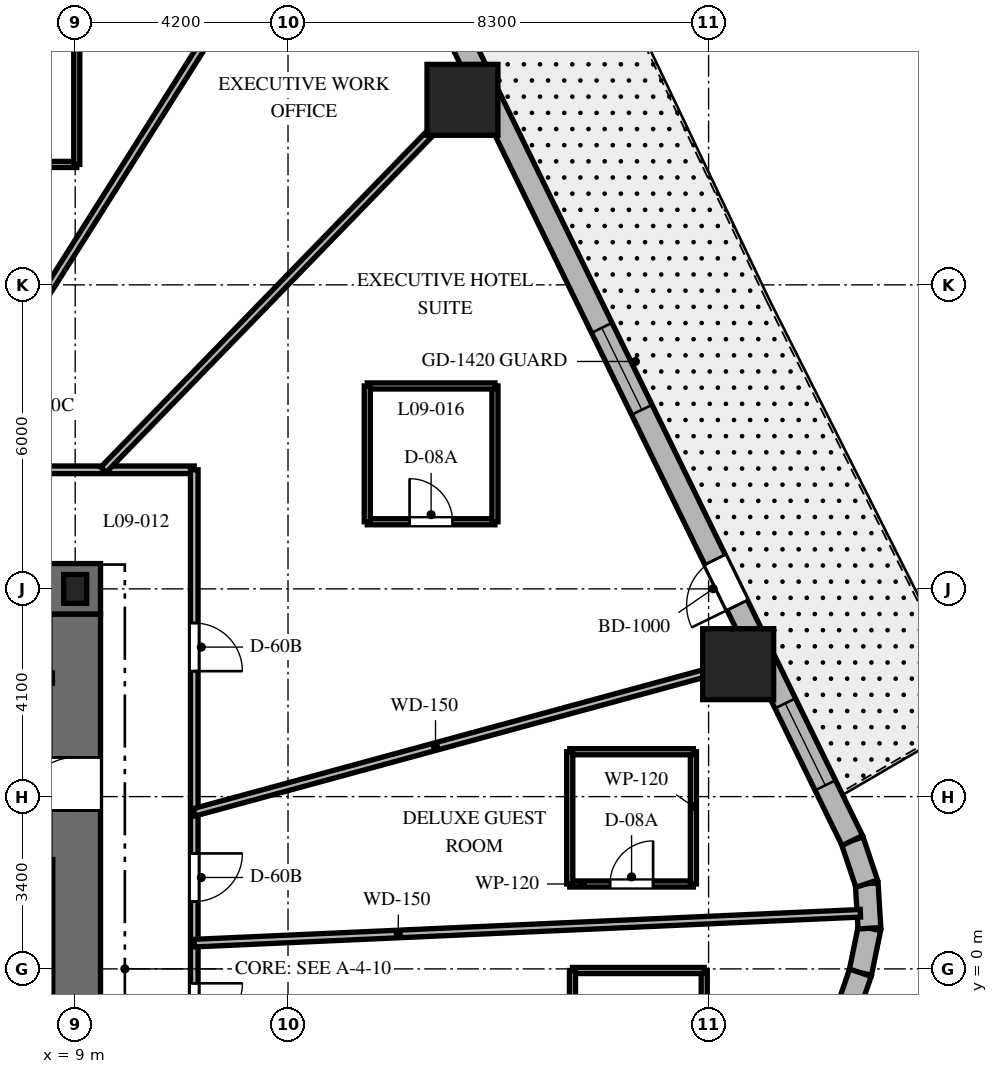
"""IFC4 building model, lengths in metres.
Left out: names, types, materials, properties, quantities, classifications, styles, units other than length and angle.
Written with IfcOpenShell. Run it as: python <this file> out.ifc"""

import sys

from ifc_helpers import new_model, si_unit, direction, frame, frame_2d, origin, origin_2d, place, context, subcontext, project, spatial, rectangle, i_section, extrude, element, fill, save


model = new_model("IFC4")
c1 = context("Model", 3, precision=1e-05, world=origin(), true_north=direction((0.0, 1.0)))
c2 = subcontext(c1, "Body", "Model", "MODEL_VIEW")
j1 = project(units=[si_unit("LENGTHUNIT", "METRE"), si_unit("PLANEANGLEUNIT", "RADIAN")], contexts=[c1])
p1 = place(None, origin())
s1 = spatial("IfcSite", under=j1, at=p1, CompositionType="ELEMENT")
p2 = place(p1, origin())
s2 = spatial("IfcBuilding", under=s1, at=p2, CompositionType="ELEMENT")
p3 = place(p2, frame((0.0, 0.0, 45.3)))
s3 = spatial("IfcBuildingStorey", under=s2, at=p3, CompositionType="ELEMENT", Elevation=45.3)
p4 = place(p3, frame((1.85, 7.5, 0.0), z_axis=(0.0, 0.0, 1.0), x_axis=(1.0, 0.0, 0.0)))
e1 = element("IfcWall", 1, at=p4, inside=s3, PredefinedType="SHEAR", context=c2, shape_type="SweptSolid", body=[
    extrude(rectangle(XDim=7.65, YDim=1.0, at=frame_2d((3.825, 0.0))), origin(), (0.0, 0.0, 1.0), 3.7),
])
p5 = place(p3, frame((9.0, -7.0, 0.0), z_axis=(0.0, 0.0, 1.0), x_axis=(0.0, 1.0, 0.0)))
e2 = element("IfcWall", 2, at=p5, inside=s3, PredefinedType="SHEAR", context=c2, shape_type="SweptSolid", body=[
    extrude(rectangle(XDim=14.0, YDim=1.0, at=frame_2d((7.0, 0.0))), origin(), (0.0, 0.0, 1.0), 3.7),
])
p6 = place(p5, frame((10.125, 0.0, 0.0)))
e3 = element("IfcOpeningElement", 3, at=p6, cuts=e2, PredefinedType="OPENING", context=c2, shape_type="SweptSolid", body=[
    extrude(rectangle(XDim=1.05, YDim=2.15, at=frame_2d((0.525, 1.075))), frame((0.0, 0.51, 0.0), z_axis=(0.0, -1.0, 0.0), x_axis=(1.0, 0.0, 0.0)), (0.0, 0.0, 1.0), 1.02),
])
p7 = place(p3, frame((8.458, -6.985, 0.0), z_axis=(0.0, 0.0, 1.0), x_axis=(0.0, 1.0, 0.0)))
e4 = element("IfcWall", 4, at=p7, inside=s3, PredefinedType="SHEAR", context=c2, shape_type="SweptSolid", body=[
    extrude(rectangle(XDim=9.143, YDim=0.2, at=frame_2d((4.572, 0.0))), origin(), (0.0, 0.0, 1.0), 3.7),
])
p8 = place(p3, frame((9.0, 7.5, 0.0), z_axis=(0.0, 0.0, 1.0), x_axis=(1.0, 0.0, 0.0)))
e5 = element("IfcColumn", 5, at=p8, inside=s3, PredefinedType="COLUMN", context=c2, shape_type="SweptSolid", body=[
    extrude(i_section(OverallWidth=0.454, OverallDepth=0.569, WebThickness=0.078, FlangeThickness=0.125, at=origin_2d()), origin(), (0.0, 0.0, 1.0), 3.7),
])
for number, where, z_axis, x_axis in (
    (6, (22.084, 6.014, 0.0), (0.0, 0.0, 1.0), (1.0, 0.0, 0.0)),
    (7, (16.643, 17.152, 0.0), (0.0, 0.0, 1.0), (1.0, 0.0, 0.0)),
):
    element("IfcColumn", number, at=place(p3, frame(where, z_axis=z_axis, x_axis=x_axis)), inside=s3, PredefinedType="COLUMN", context=c2, shape_type="SweptSolid", body=[
        extrude(rectangle(XDim=1.4, YDim=1.4, at=origin_2d()), origin(), (0.0, 0.0, 1.0), 3.7),
    ])
p9 = place(p3, frame((24.496, -0.077, 0.0), z_axis=(0.0, 0.0, 1.0), x_axis=(0.199570594521, 0.979883451132, 0.0)))
e8 = element("IfcWall", 8, at=p9, inside=s3, PredefinedType="SOLIDWALL", context=c2, shape_type="SweptSolid", body=[
    extrude(rectangle(XDim=0.897, YDim=0.45, at=frame_2d((0.448, 0.0))), origin(), (0.0, 0.0, 1.0), 3.4),
])
p10 = place(p3, frame((24.675, 0.802, 0.0), z_axis=(0.0, 0.0, 1.0), x_axis=(-0.061188874166, 0.998126205286, 0.0)))
e9 = element("IfcWall", 9, at=p10, inside=s3, PredefinedType="SOLIDWALL", context=c2, shape_type="SweptSolid", body=[
    extrude(rectangle(XDim=0.882, YDim=0.45, at=frame_2d((0.441, 0.0))), origin(), (0.0, 0.0, 1.0), 3.4),
])
p11 = place(p3, frame((24.621, 1.682, 0.0), z_axis=(0.0, 0.0, 1.0), x_axis=(-0.317697451681, 0.948192137278, 0.0)))
e10 = element("IfcWall", 10, at=p11, inside=s3, PredefinedType="SOLIDWALL", context=c2, shape_type="SweptSolid", body=[
    extrude(rectangle(XDim=0.897, YDim=0.45, at=frame_2d((0.448, 0.0))), origin(), (0.0, 0.0, 1.0), 3.4),
])
p12 = place(p3, frame((17.39, -20.678, 0.0), z_axis=(0.0, 0.0, 1.0), x_axis=(0.326068018294, 0.945346310854, 0.0)))
e11 = element("IfcWall", 11, at=p12, inside=s3, PredefinedType="SOLIDWALL", context=c2, shape_type="SweptSolid", body=[
    extrude(rectangle(XDim=21.793, YDim=0.45, at=frame_2d((10.896, 0.0))), origin(), (0.0, 0.0, 1.0), 3.4),
])
p13 = place(p12, frame((5.493, 0.0, 0.0)))
e12 = element("IfcOpeningElement", 12, at=p13, cuts=e11, PredefinedType="OPENING", context=c2, shape_type="SweptSolid", body=[
    extrude(rectangle(XDim=0.95, YDim=2.15, at=frame_2d((0.475, 1.075))), frame((0.0, 0.235, 0.0), z_axis=(0.0, -1.0, 0.0), x_axis=(1.0, 0.0, 0.0)), (0.0, 0.0, 1.0), 0.47),
])
p14 = place(p12, frame((1.26, 0.0, 0.8)))
e13 = element("IfcOpeningElement", 13, at=p14, cuts=e11, PredefinedType="OPENING", context=c2, shape_type="SweptSolid", body=[
    extrude(rectangle(XDim=1.8, YDim=1.8, at=frame_2d((0.9, 0.9))), frame((0.0, 0.235, 0.0), z_axis=(0.0, -1.0, 0.0), x_axis=(1.0, 0.0, 0.0)), (0.0, 0.0, 1.0), 0.47),
])
p15 = place(p12, frame((7.283, 0.0, 0.8)))
e14 = element("IfcOpeningElement", 14, at=p15, cuts=e11, PredefinedType="OPENING", context=c2, shape_type="SweptSolid", body=[
    extrude(rectangle(XDim=1.8, YDim=1.8, at=frame_2d((0.9, 0.9))), frame((0.0, 0.235, 0.0), z_axis=(0.0, -1.0, 0.0), x_axis=(1.0, 0.0, 0.0)), (0.0, 0.0, 1.0), 0.47),
])
p16 = place(p12, frame((12.736, 0.0, 0.8)))
e15 = element("IfcOpeningElement", 15, at=p16, cuts=e11, PredefinedType="OPENING", context=c2, shape_type="SweptSolid", body=[
    extrude(rectangle(XDim=1.8, YDim=1.8, at=frame_2d((0.9, 0.9))), frame((0.0, 0.235, 0.0), z_axis=(0.0, -1.0, 0.0), x_axis=(1.0, 0.0, 0.0)), (0.0, 0.0, 1.0), 0.47),
])
p17 = place(p12, frame((18.68, 0.0, 0.8)))
e16 = element("IfcOpeningElement", 16, at=p17, cuts=e11, PredefinedType="OPENING", context=c2, shape_type="SweptSolid", body=[
    extrude(rectangle(XDim=1.8, YDim=1.8, at=frame_2d((0.9, 0.9))), frame((0.0, 0.235, 0.0), z_axis=(0.0, -1.0, 0.0), x_axis=(1.0, 0.0, 0.0)), (0.0, 0.0, 1.0), 0.47),
])
p18 = place(p3, frame((24.336, 2.532, 0.0), z_axis=(0.0, 0.0, 1.0), x_axis=(-0.438931326393, 0.898520612291, 0.0)))
e17 = element("IfcWall", 17, at=p18, inside=s3, PredefinedType="SOLIDWALL", context=c2, shape_type="SweptSolid", body=[
    extrude(rectangle(XDim=20.623, YDim=0.45, at=frame_2d((10.312, 0.0))), origin(), (0.0, 0.0, 1.0), 3.4),
])
p19 = place(p18, frame((5.171, 0.0, 0.0)))
e18 = element("IfcOpeningElement", 18, at=p19, cuts=e17, PredefinedType="OPENING", context=c2, shape_type="SweptSolid", body=[
    extrude(rectangle(XDim=1.0, YDim=2.15, at=frame_2d((0.5, 1.075))), frame((0.0, 0.235, 0.0), z_axis=(0.0, -1.0, 0.0), x_axis=(1.0, 0.0, 0.0)), (0.0, 0.0, 1.0), 0.47),
])
p20 = place(p18, frame((1.214, 0.0, 0.8)))
e19 = element("IfcOpeningElement", 19, at=p20, cuts=e17, PredefinedType="OPENING", context=c2, shape_type="SweptSolid", body=[
    extrude(rectangle(XDim=1.8, YDim=1.8, at=frame_2d((0.9, 0.9))), frame((0.0, 0.235, 0.0), z_axis=(0.0, -1.0, 0.0), x_axis=(1.0, 0.0, 0.0)), (0.0, 0.0, 1.0), 0.47),
])
p21 = place(p18, frame((9.462, 0.0, 0.8)))
e20 = element("IfcOpeningElement", 20, at=p21, cuts=e17, PredefinedType="OPENING", context=c2, shape_type="SweptSolid", body=[
    extrude(rectangle(XDim=1.8, YDim=1.8, at=frame_2d((0.9, 0.9))), frame((0.0, 0.235, 0.0), z_axis=(0.0, -1.0, 0.0), x_axis=(1.0, 0.0, 0.0)), (0.0, 0.0, 1.0), 0.47),
])
p22 = place(p18, frame((17.66, 0.0, 0.8)))
e21 = element("IfcOpeningElement", 21, at=p22, cuts=e17, PredefinedType="OPENING", context=c2, shape_type="SweptSolid", body=[
    extrude(rectangle(XDim=1.8, YDim=1.8, at=frame_2d((0.9, 0.9))), frame((0.0, 0.235, 0.0), z_axis=(0.0, -1.0, 0.0), x_axis=(1.0, 0.0, 0.0)), (0.0, 0.0, 1.0), 0.47),
])
p23 = place(p3, frame((-11.35, 9.85, 0.0), z_axis=(0.0, 0.0, 1.0), x_axis=(1.0, 0.0, 0.0)))
e22 = element("IfcWall", 22, at=p23, inside=s3, PredefinedType="PARTITIONING", context=c2, shape_type="SweptSolid", body=[
    extrude(rectangle(XDim=22.7, YDim=0.15, at=frame_2d((11.35, 0.0))), origin(), (0.0, 0.0, 1.0), 2.84),
])
p24 = place(p23, frame((18.837, 0.0, 0.0)))
e23 = element("IfcOpeningElement", 23, at=p24, cuts=e22, PredefinedType="OPENING", context=c2, shape_type="SweptSolid", body=[
    extrude(rectangle(XDim=0.9, YDim=2.03, at=frame_2d((0.45, 1.015))), frame((0.0, 0.085, 0.0), z_axis=(0.0, -1.0, 0.0), x_axis=(1.0, 0.0, 0.0)), (0.0, 0.0, 1.0), 0.17),
])
p25 = place(p23, frame((15.532, 0.0, 0.0)))
e24 = element("IfcOpeningElement", 24, at=p25, cuts=e22, PredefinedType="OPENING", context=c2, shape_type="SweptSolid", body=[
    extrude(rectangle(XDim=0.95, YDim=2.03, at=frame_2d((0.475, 1.015))), frame((0.0, 0.085, 0.0), z_axis=(0.0, -1.0, 0.0), x_axis=(1.0, 0.0, 0.0)), (0.0, 0.0, 1.0), 0.17),
])
p26 = place(p23, frame((10.444, 0.0, 0.0)))
e25 = element("IfcOpeningElement", 25, at=p26, cuts=e22, PredefinedType="OPENING", context=c2, shape_type="SweptSolid", body=[
    extrude(rectangle(XDim=0.95, YDim=2.03, at=frame_2d((0.475, 1.015))), frame((0.0, 0.085, 0.0), z_axis=(0.0, -1.0, 0.0), x_axis=(1.0, 0.0, 0.0)), (0.0, 0.0, 1.0), 0.17),
])
p27 = place(p23, frame((5.252, 0.0, 0.0)))
e26 = element("IfcOpeningElement", 26, at=p27, cuts=e22, PredefinedType="OPENING", context=c2, shape_type="SweptSolid", body=[
    extrude(rectangle(XDim=0.95, YDim=2.03, at=frame_2d((0.475, 1.015))), frame((0.0, 0.085, 0.0), z_axis=(0.0, -1.0, 0.0), x_axis=(1.0, 0.0, 0.0)), (0.0, 0.0, 1.0), 0.17),
])
p28 = place(p23, frame((1.702, 0.0, 0.0)))
e27 = element("IfcOpeningElement", 27, at=p28, cuts=e22, PredefinedType="OPENING", context=c2, shape_type="SweptSolid", body=[
    extrude(rectangle(XDim=0.9, YDim=2.03, at=frame_2d((0.45, 1.015))), frame((0.0, 0.085, 0.0), z_axis=(0.0, -1.0, 0.0), x_axis=(1.0, 0.0, 0.0)), (0.0, 0.0, 1.0), 0.17),
])
p29 = place(p3, frame((11.35, 9.85, 0.0), z_axis=(0.0, 0.0, 1.0), x_axis=(0.0, -1.0, 0.0)))
e28 = element("IfcWall", 28, at=p29, inside=s3, PredefinedType="PARTITIONING", context=c2, shape_type="SweptSolid", body=[
    extrude(rectangle(XDim=19.7, YDim=0.15, at=frame_2d((9.85, 0.0))), origin(), (0.0, 0.0, 1.0), 2.84),
])
p30 = place(p29, frame((7.571, 0.0, 0.0)))
e29 = element("IfcOpeningElement", 29, at=p30, cuts=e28, PredefinedType="OPENING", context=c2, shape_type="SweptSolid", body=[
    extrude(rectangle(XDim=0.95, YDim=2.03, at=frame_2d((0.475, 1.015))), frame((0.0, 0.085, 0.0), z_axis=(0.0, -1.0, 0.0), x_axis=(1.0, 0.0, 0.0)), (0.0, 0.0, 1.0), 0.17),
])
p31 = place(p29, frame((3.024, 0.0, 0.0)))
e30 = element("IfcOpeningElement", 30, at=p31, cuts=e28, PredefinedType="OPENING", context=c2, shape_type="SweptSolid", body=[
    extrude(rectangle(XDim=0.95, YDim=2.03, at=frame_2d((0.475, 1.015))), frame((0.0, 0.085, 0.0), z_axis=(0.0, -1.0, 0.0), x_axis=(1.0, 0.0, 0.0)), (0.0, 0.0, 1.0), 0.17),
])
p32 = place(p29, frame((17.181, 0.0, 0.0)))
e31 = element("IfcOpeningElement", 31, at=p32, cuts=e28, PredefinedType="OPENING", context=c2, shape_type="SweptSolid", body=[
    extrude(rectangle(XDim=0.95, YDim=2.03, at=frame_2d((0.475, 1.015))), frame((0.0, 0.085, 0.0), z_axis=(0.0, -1.0, 0.0), x_axis=(1.0, 0.0, 0.0)), (0.0, 0.0, 1.0), 0.17),
])
p33 = place(p29, frame((13.403, 0.0, 0.0)))
e32 = element("IfcOpeningElement", 32, at=p33, cuts=e28, PredefinedType="OPENING", context=c2, shape_type="SweptSolid", body=[
    extrude(rectangle(XDim=0.95, YDim=2.03, at=frame_2d((0.475, 1.015))), frame((0.0, 0.085, 0.0), z_axis=(0.0, -1.0, 0.0), x_axis=(1.0, 0.0, 0.0)), (0.0, 0.0, 1.0), 0.17),
])
p34 = place(p29, frame((10.134, 0.0, 0.0)))
e33 = element("IfcOpeningElement", 33, at=p34, cuts=e28, PredefinedType="OPENING", context=c2, shape_type="SweptSolid", body=[
    extrude(rectangle(XDim=0.95, YDim=2.03, at=frame_2d((0.475, 1.015))), frame((0.0, 0.085, 0.0), z_axis=(0.0, -1.0, 0.0), x_axis=(1.0, 0.0, 0.0)), (0.0, 0.0, 1.0), 0.17),
])
p35 = place(p3, frame((11.35, 0.508, 0.0), z_axis=(0.0, 0.0, 1.0), x_axis=(0.998998237556, 0.044749540337, 0.0)))
e34 = element("IfcWall", 34, at=p35, inside=s3, PredefinedType="PARTITIONING", context=c2, shape_type="SweptSolid", body=[
    extrude(rectangle(XDim=13.159, YDim=0.15, at=frame_2d((6.58, 0.0))), origin(), (0.0, 0.0, 1.0), 2.54),
])
p36 = place(p3, frame((11.35, 3.091, 0.0), z_axis=(0.0, 0.0, 1.0), x_axis=(0.964859685283, 0.262765651704, 0.0)))
e35 = element("IfcWall", 35, at=p36, inside=s3, PredefinedType="PARTITIONING", context=c2, shape_type="SweptSolid", body=[
    extrude(rectangle(XDim=11.629, YDim=0.15, at=frame_2d((5.814, 0.0))), origin(), (0.0, 0.0, 1.0), 2.54),
])
p37 = place(p3, frame((9.558, 9.85, 0.0), z_axis=(0.0, 0.0, 1.0), x_axis=(0.69638346089, 0.717669893056, 0.0)))
e36 = element("IfcWall", 36, at=p37, inside=s3, PredefinedType="PARTITIONING", context=c2, shape_type="SweptSolid", body=[
    extrude(rectangle(XDim=10.701, YDim=0.15, at=frame_2d((5.351, 0.0))), origin(), (0.0, 0.0, 1.0), 2.54),
])
p38 = place(p3, frame((6.222, 9.85, 0.0), z_axis=(0.0, 0.0, 1.0), x_axis=(0.534069056435, 0.845440857162, 0.0)))
e37 = element("IfcWall", 37, at=p38, inside=s3, PredefinedType="PARTITIONING", context=c2, shape_type="SweptSolid", body=[
    extrude(rectangle(XDim=14.611, YDim=0.15, at=frame_2d((7.306, 0.0))), origin(), (0.0, 0.0, 1.0), 2.54),
])
p39 = place(p3, frame((18.76, 1.676, 0.0), z_axis=(0.0, 0.0, 1.0), x_axis=(1.0, 0.0, 0.0)))
e38 = element("IfcWall", 38, at=p39, inside=s3, PredefinedType="PARTITIONING", context=c2, shape_type="SweptSolid", body=[
    extrude(rectangle(XDim=2.44, YDim=0.12, at=frame_2d((1.22, 0.0))), origin(), (0.0, 0.0, 1.0), 3.4),
])
p40 = place(p39, frame((0.795, 0.0, 0.0)))
e39 = element("IfcOpeningElement", 39, at=p40, cuts=e38, PredefinedType="OPENING", context=c2, shape_type="SweptSolid", body=[
    extrude(rectangle(XDim=0.85, YDim=2.03, at=frame_2d((0.425, 1.015))), frame((0.0, 0.07, 0.0), z_axis=(0.0, -1.0, 0.0), x_axis=(1.0, 0.0, 0.0)), (0.0, 0.0, 1.0), 0.14),
])
p41 = place(p3, frame((21.2, 1.676, 0.0), z_axis=(0.0, 0.0, 1.0), x_axis=(0.0, 1.0, 0.0)))
e40 = element("IfcWall", 40, at=p41, inside=s3, PredefinedType="PARTITIONING", context=c2, shape_type="SweptSolid", body=[
    extrude(rectangle(XDim=2.61, YDim=0.12, at=frame_2d((1.305, 0.0))), origin(), (0.0, 0.0, 1.0), 3.4),
])
p42 = place(p3, frame((21.2, 4.286, 0.0), z_axis=(0.0, 0.0, 1.0), x_axis=(-1.0, 0.0, 0.0)))
e41 = element("IfcWall", 41, at=p42, inside=s3, PredefinedType="PARTITIONING", context=c2, shape_type="SweptSolid", body=[
    extrude(rectangle(XDim=2.44, YDim=0.12, at=frame_2d((1.22, 0.0))), origin(), (0.0, 0.0, 1.0), 3.4),
])
p43 = place(p3, frame((18.76, 4.286, 0.0), z_axis=(0.0, 0.0, 1.0), x_axis=(0.0, -1.0, 0.0)))
e42 = element("IfcWall", 42, at=p43, inside=s3, PredefinedType="PARTITIONING", context=c2, shape_type="SweptSolid", body=[
    extrude(rectangle(XDim=2.61, YDim=0.12, at=frame_2d((1.305, 0.0))), origin(), (0.0, 0.0, 1.0), 3.4),
])
p44 = place(p3, frame((14.764, 8.825, 0.0), z_axis=(0.0, 0.0, 1.0), x_axis=(1.0, 0.0, 0.0)))
e43 = element("IfcWall", 43, at=p44, inside=s3, PredefinedType="PARTITIONING", context=c2, shape_type="SweptSolid", body=[
    extrude(rectangle(XDim=2.52, YDim=0.12, at=frame_2d((1.26, 0.0))), origin(), (0.0, 0.0, 1.0), 2.927),
])
p45 = place(p44, frame((0.835, 0.0, 0.0)))
e44 = element("IfcOpeningElement", 44, at=p45, cuts=e43, PredefinedType="OPENING", context=c2, shape_type="SweptSolid", body=[
    extrude(rectangle(XDim=0.85, YDim=2.03, at=frame_2d((0.425, 1.015))), frame((0.0, 0.07, 0.0), z_axis=(0.0, -1.0, 0.0), x_axis=(1.0, 0.0, 0.0)), (0.0, 0.0, 1.0), 0.14),
])
p46 = place(p3, frame((17.284, 8.825, 0.0), z_axis=(0.0, 0.0, 1.0), x_axis=(0.0, 1.0, 0.0)))
e45 = element("IfcWall", 45, at=p46, inside=s3, PredefinedType="PARTITIONING", context=c2, shape_type="SweptSolid", body=[
    extrude(rectangle(XDim=2.68, YDim=0.12, at=frame_2d((1.34, 0.0))), origin(), (0.0, 0.0, 1.0), 3.4),
])
p47 = place(p3, frame((17.284, 11.505, 0.0), z_axis=(0.0, 0.0, 1.0), x_axis=(-1.0, 0.0, 0.0)))
e46 = element("IfcWall", 46, at=p47, inside=s3, PredefinedType="PARTITIONING", context=c2, shape_type="SweptSolid", body=[
    extrude(rectangle(XDim=2.52, YDim=0.12, at=frame_2d((1.26, 0.0))), origin(), (0.0, 0.0, 1.0), 2.927),
])
p48 = place(p3, frame((14.764, 11.505, 0.0), z_axis=(0.0, 0.0, 1.0), x_axis=(0.0, -1.0, 0.0)))
e47 = element("IfcWall", 47, at=p48, inside=s3, PredefinedType="PARTITIONING", context=c2, shape_type="SweptSolid", body=[
    extrude(rectangle(XDim=2.68, YDim=0.12, at=frame_2d((1.34, 0.0))), origin(), (0.0, 0.0, 1.0), 3.4),
])
p49 = place(p3, frame((6.351, 15.877, 0.0), z_axis=(0.0, 0.0, 1.0), x_axis=(1.0, 0.0, 0.0)))
e48 = element("IfcWall", 48, at=p49, inside=s3, PredefinedType="PARTITIONING", context=c2, shape_type="SweptSolid", body=[
    extrude(rectangle(XDim=2.68, YDim=0.12, at=frame_2d((1.34, 0.0))), origin(), (0.0, 0.0, 1.0), 2.84),
])
p50 = place(p49, frame((0.915, 0.0, 0.0)))
e49 = element("IfcOpeningElement", 49, at=p50, cuts=e48, PredefinedType="OPENING", context=c2, shape_type="SweptSolid", body=[
    extrude(rectangle(XDim=0.85, YDim=2.03, at=frame_2d((0.425, 1.015))), frame((0.0, 0.07, 0.0), z_axis=(0.0, -1.0, 0.0), x_axis=(1.0, 0.0, 0.0)), (0.0, 0.0, 1.0), 0.14),
])
p51 = place(p3, frame((9.031, 15.877, 0.0), z_axis=(0.0, 0.0, 1.0), x_axis=(0.0, 1.0, 0.0)))
e50 = element("IfcWall", 50, at=p51, inside=s3, PredefinedType="PARTITIONING", context=c2, shape_type="SweptSolid", body=[
    extrude(rectangle(XDim=2.54, YDim=0.12, at=frame_2d((1.27, 0.0))), origin(), (0.0, 0.0, 1.0), 2.972),
])
p52 = place(p3, frame((21.414, -2.782, 0.0), z_axis=(0.0, 0.0, 1.0), x_axis=(0.0, 1.0, 0.0)))
e51 = element("IfcWall", 51, at=p52, inside=s3, PredefinedType="PARTITIONING", context=c2, shape_type="SweptSolid", body=[
    extrude(rectangle(XDim=2.75, YDim=0.12, at=frame_2d((1.375, 0.0))), origin(), (0.0, 0.0, 1.0), 3.4),
])
p53 = place(p3, frame((21.414, -0.032, 0.0), z_axis=(0.0, 0.0, 1.0), x_axis=(-1.0, 0.0, 0.0)))
e52 = element("IfcWall", 52, at=p53, inside=s3, PredefinedType="PARTITIONING", context=c2, shape_type="SweptSolid", body=[
    extrude(rectangle(XDim=2.6, YDim=0.12, at=frame_2d((1.3, 0.0))), origin(), (0.0, 0.0, 1.0), 3.4),
])
p54 = place(p3, frame((18.814, -0.032, 0.0), z_axis=(0.0, 0.0, 1.0), x_axis=(0.0, -1.0, 0.0)))
e53 = element("IfcWall", 53, at=p54, inside=s3, PredefinedType="PARTITIONING", context=c2, shape_type="SweptSolid", body=[
    extrude(rectangle(XDim=2.75, YDim=0.12, at=frame_2d((1.375, 0.0))), origin(), (0.0, 0.0, 1.0), 3.4),
])
p55 = place(p19, origin())
e54 = element("IfcDoor", 54, at=p55, inside=s3, OperationType="SINGLE_SWING_LEFT", PredefinedType="DOOR", context=c2, shape_type="SweptSolid", body=[
    extrude(rectangle(XDim=1.0, YDim=2.15, at=frame_2d((0.5, 1.075))), frame((0.0, 0.025, 0.0), z_axis=(0.0, -1.0, 0.0), x_axis=(1.0, 0.0, 0.0)), (0.0, 0.0, 1.0), 0.05),
])
fill(e18, e54)
p56 = place(p20, origin())
e55 = element("IfcWindow", 55, at=p56, inside=s3, PartitioningType="SINGLE_PANEL", PredefinedType="WINDOW", context=c2, shape_type="SweptSolid", body=[
    extrude(rectangle(XDim=1.8, YDim=1.8, at=frame_2d((0.9, 0.9))), frame((0.0, 0.03, 0.0), z_axis=(0.0, -1.0, 0.0), x_axis=(1.0, 0.0, 0.0)), (0.0, 0.0, 1.0), 0.06),
])
fill(e19, e55)
p57 = place(p21, origin())
e56 = element("IfcWindow", 56, at=p57, inside=s3, PartitioningType="SINGLE_PANEL", PredefinedType="WINDOW", context=c2, shape_type="SweptSolid", body=[
    extrude(rectangle(XDim=1.8, YDim=1.8, at=frame_2d((0.9, 0.9))), frame((0.0, 0.03, 0.0), z_axis=(0.0, -1.0, 0.0), x_axis=(1.0, 0.0, 0.0)), (0.0, 0.0, 1.0), 0.06),
])
fill(e20, e56)
p58 = place(p6, origin())
e57 = element("IfcDoor", 57, at=p58, inside=s3, OperationType="SINGLE_SWING_LEFT", PredefinedType="DOOR", context=c2, shape_type="SweptSolid", body=[
    extrude(rectangle(XDim=1.05, YDim=2.15, at=frame_2d((0.525, 1.075))), frame((0.0, 0.025, 0.0), z_axis=(0.0, -1.0, 0.0), x_axis=(1.0, 0.0, 0.0)), (0.0, 0.0, 1.0), 0.05),
])
fill(e3, e57)
p59 = place(p30, origin())
e58 = element("IfcDoor", 58, at=p59, inside=s3, OperationType="SINGLE_SWING_LEFT", PredefinedType="DOOR", context=c2, shape_type="SweptSolid", body=[
    extrude(rectangle(XDim=0.95, YDim=2.03, at=frame_2d((0.475, 1.015))), frame((0.0, 0.025, 0.0), z_axis=(0.0, -1.0, 0.0), x_axis=(1.0, 0.0, 0.0)), (0.0, 0.0, 1.0), 0.05),
])
fill(e29, e58)
p60 = place(p40, origin())
e59 = element("IfcDoor", 59, at=p60, inside=s3, OperationType="SINGLE_SWING_RIGHT", PredefinedType="DOOR", context=c2, shape_type="SweptSolid", body=[
    extrude(rectangle(XDim=0.85, YDim=2.03, at=frame_2d((0.425, 1.015))), frame((0.0, 0.025, 0.0), z_axis=(0.0, -1.0, 0.0), x_axis=(1.0, 0.0, 0.0)), (0.0, 0.0, 1.0), 0.05),
])
fill(e39, e59)
p61 = place(p31, origin())
e60 = element("IfcDoor", 60, at=p61, inside=s3, OperationType="SINGLE_SWING_RIGHT", PredefinedType="DOOR", context=c2, shape_type="SweptSolid", body=[
    extrude(rectangle(XDim=0.95, YDim=2.03, at=frame_2d((0.475, 1.015))), frame((0.0, 0.025, 0.0), z_axis=(0.0, -1.0, 0.0), x_axis=(1.0, 0.0, 0.0)), (0.0, 0.0, 1.0), 0.05),
])
fill(e30, e60)
p62 = place(p45, origin())
e61 = element("IfcDoor", 61, at=p62, inside=s3, OperationType="SINGLE_SWING_LEFT", PredefinedType="DOOR", context=c2, shape_type="SweptSolid", body=[
    extrude(rectangle(XDim=0.85, YDim=2.03, at=frame_2d((0.425, 1.015))), frame((0.0, 0.025, 0.0), z_axis=(0.0, -1.0, 0.0), x_axis=(1.0, 0.0, 0.0)), (0.0, 0.0, 1.0), 0.05),
])
fill(e44, e61)
p63 = place(p34, origin())
e62 = element("IfcDoor", 62, at=p63, inside=s3, OperationType="SINGLE_SWING_LEFT", PredefinedType="DOOR", context=c2, shape_type="SweptSolid", body=[
    extrude(rectangle(XDim=0.95, YDim=2.03, at=frame_2d((0.475, 1.015))), frame((0.0, 0.025, 0.0), z_axis=(0.0, -1.0, 0.0), x_axis=(1.0, 0.0, 0.0)), (0.0, 0.0, 1.0), 0.05),
])
fill(e33, e62)
save(model, sys.argv[1])
